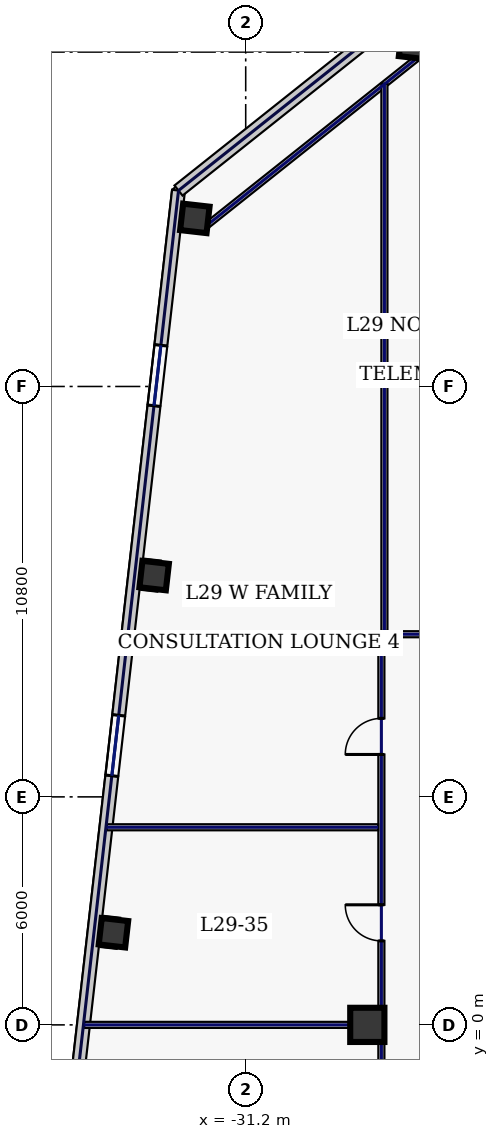
"""IFC4 building model, lengths in metres.
Left out: names, types, materials, properties, quantities, classifications, styles, units other than length and angle.
Written with IfcOpenShell. Run it as: python <this file> out.ifc"""

import sys

from ifc_helpers import new_model, si_unit, direction, frame, frame_2d, origin, origin_2d, place, context, subcontext, project, spatial, rectangle, hollow_rectangle, extrude, element, fill, save


model = new_model("IFC4")
c1 = context("Model", 3, precision=1e-05, world=origin(), true_north=direction((0.0, 1.0)))
c2 = subcontext(c1, "Body", "Model", "MODEL_VIEW")
j1 = project(units=[si_unit("LENGTHUNIT", "METRE"), si_unit("PLANEANGLEUNIT", "RADIAN")], contexts=[c1])
p1 = place(None, origin())
s1 = spatial("IfcSite", under=j1, at=p1, CompositionType="ELEMENT")
p2 = place(p1, origin())
s2 = spatial("IfcBuilding", under=s1, at=p2, CompositionType="ELEMENT")
p3 = place(p2, frame((0.0, 0.0, 129.4)))
s3 = spatial("IfcBuildingStorey", under=s2, at=p3, CompositionType="ELEMENT", Elevation=129.4)
p4 = place(p3, frame((-28.0, 0.0, 0.0), z_axis=(0.0, 0.0, 1.0), x_axis=(1.0, 0.0, 0.0)))
e1 = element("IfcColumn", 1, at=p4, inside=s3, PredefinedType="COLUMN", context=c2, shape_type="SweptSolid", body=[
    extrude(hollow_rectangle(XDim=0.9, YDim=0.9, WallThickness=0.04, at=origin_2d()), origin(), (0.0, 0.0, 1.0), 3.74),
])
for number, where, z_axis, x_axis in (
    (2, (-26.783, 25.801, 0.0), (0.0, 0.0, 1.0), (0.994, -0.113, 0.0)),
    (3, (-32.538, 21.223, 0.0), (0.0, 0.0, 1.0), (0.994, -0.113, 0.0)),
    (4, (-33.609, 11.824, 0.0), (0.0, 0.0, 1.0), (0.994, -0.113, 0.0)),
    (5, (-34.68, 2.425, 0.0), (0.0, 0.0, 1.0), (0.994, -0.113, 0.0)),
):
    element("IfcColumn", number, at=place(p3, frame(where, z_axis=z_axis, x_axis=x_axis)), inside=s3, PredefinedType="COLUMN", context=c2, shape_type="SweptSolid", body=[
        extrude(hollow_rectangle(XDim=0.7, YDim=0.7, WallThickness=0.032, at=origin_2d()), origin(), (0.0, 0.0, 1.0), 3.74),
    ])
p5 = place(p3, frame((-6.314, 23.982, 0.0), z_axis=(0.0, 0.0, 1.0), x_axis=(-0.993571362037, 0.113207546299, 0.0)))
e6 = element("IfcWall", 6, at=p5, inside=s3, PredefinedType="STANDARD", context=c2, shape_type="SweptSolid", body=[
    extrude(rectangle(XDim=21.223, YDim=0.34, at=frame_2d((10.611, 0.0))), origin(), (0.0, 0.0, 1.0), 3.74),
])
p6 = place(p5, frame((17.265, 0.0, 0.22)))
e7 = element("IfcOpeningElement", 7, at=p6, cuts=e6, PredefinedType="OPENING", context=c2, shape_type="SweptSolid", body=[
    extrude(rectangle(XDim=1.6, YDim=1.2, at=frame_2d((0.8, 0.6))), frame((0.0, 0.18, 0.0), z_axis=(0.0, -1.0, 0.0), x_axis=(1.0, 0.0, 0.0)), (0.0, 0.0, 1.0), 0.36),
])
p7 = place(p5, frame((12.794, 0.0, 0.67)))
e8 = element("IfcOpeningElement", 8, at=p7, cuts=e6, PredefinedType="OPENING", context=c2, shape_type="SweptSolid", body=[
    extrude(rectangle(XDim=2.1, YDim=2.2, at=frame_2d((1.05, 1.1))), frame((0.0, 0.18, 0.0), z_axis=(0.0, -1.0, 0.0), x_axis=(1.0, 0.0, 0.0)), (0.0, 0.0, 1.0), 0.36),
])
p8 = place(p5, frame((7.838, 0.0, 0.67)))
e9 = element("IfcOpeningElement", 9, at=p8, cuts=e6, PredefinedType="OPENING", context=c2, shape_type="SweptSolid", body=[
    extrude(rectangle(XDim=2.1, YDim=2.2, at=frame_2d((1.05, 1.1))), frame((0.0, 0.18, 0.0), z_axis=(0.0, -1.0, 0.0), x_axis=(1.0, 0.0, 0.0)), (0.0, 0.0, 1.0), 0.36),
])
p9 = place(p5, frame((3.616, 0.0, 0.67)))
e10 = element("IfcOpeningElement", 10, at=p9, cuts=e6, PredefinedType="OPENING", context=c2, shape_type="SweptSolid", body=[
    extrude(rectangle(XDim=0.85, YDim=1.85, at=frame_2d((0.425, 0.925))), frame((0.0, 0.18, 0.0), z_axis=(0.0, -1.0, 0.0), x_axis=(1.0, 0.0, 0.0)), (0.0, 0.0, 1.0), 0.36),
])
p10 = place(p3, frame((-32.968, 21.957, 0.0), z_axis=(0.0, 0.0, 1.0), x_axis=(-0.113201605824, -0.993572038877, 0.0)))
e11 = element("IfcWall", 11, at=p10, inside=s3, PredefinedType="STANDARD", context=c2, shape_type="SweptSolid", body=[
    extrude(rectangle(XDim=39.2, YDim=0.34, at=frame_2d((19.6, 0.0))), origin(), (0.0, 0.0, 1.0), 3.74),
])
p11 = place(p10, frame((4.1, 0.0, 0.58)))
e12 = element("IfcOpeningElement", 12, at=p11, cuts=e11, PredefinedType="OPENING", context=c2, shape_type="SweptSolid", body=[
    extrude(rectangle(XDim=1.6, YDim=2.3, at=frame_2d((0.8, 1.15))), frame((0.0, 0.18, 0.0), z_axis=(0.0, -1.0, 0.0), x_axis=(1.0, 0.0, 0.0)), (0.0, 0.0, 1.0), 0.36),
])
p12 = place(p10, frame((13.9, 0.0, 0.58)))
e13 = element("IfcOpeningElement", 13, at=p12, cuts=e11, PredefinedType="OPENING", context=c2, shape_type="SweptSolid", body=[
    extrude(rectangle(XDim=1.6, YDim=2.3, at=frame_2d((0.8, 1.15))), frame((0.0, 0.18, 0.0), z_axis=(0.0, -1.0, 0.0), x_axis=(1.0, 0.0, 0.0)), (0.0, 0.0, 1.0), 0.36),
])
p13 = place(p10, frame((23.7, 0.0, 0.58)))
e14 = element("IfcOpeningElement", 14, at=p13, cuts=e11, PredefinedType="OPENING", context=c2, shape_type="SweptSolid", body=[
    extrude(rectangle(XDim=1.6, YDim=2.3, at=frame_2d((0.8, 1.15))), frame((0.0, 0.18, 0.0), z_axis=(0.0, -1.0, 0.0), x_axis=(1.0, 0.0, 0.0)), (0.0, 0.0, 1.0), 0.36),
])
p14 = place(p10, frame((33.5, 0.0, 0.58)))
e15 = element("IfcOpeningElement", 15, at=p14, cuts=e11, PredefinedType="OPENING", context=c2, shape_type="SweptSolid", body=[
    extrude(rectangle(XDim=1.6, YDim=2.3, at=frame_2d((0.8, 1.15))), frame((0.0, 0.18, 0.0), z_axis=(0.0, -1.0, 0.0), x_axis=(1.0, 0.0, 0.0)), (0.0, 0.0, 1.0), 0.36),
])
p15 = place(p3, frame((-27.401, 26.385, 0.0), z_axis=(0.0, 0.0, 1.0), x_axis=(-0.78261359446, -0.622507800567, 0.0)))
e16 = element("IfcWall", 16, at=p15, inside=s3, PredefinedType="STANDARD", context=c2, shape_type="SweptSolid", body=[
    extrude(rectangle(XDim=7.114, YDim=0.34, at=frame_2d((3.557, 0.0))), origin(), (0.0, 0.0, 1.0), 3.74),
])
p16 = place(p3, frame((-26.571, 25.535, 0.0), z_axis=(0.0, 0.0, 1.0), x_axis=(-0.782617962887, -0.622502308564, 0.0)))
e17 = element("IfcWall", 17, at=p16, inside=s3, PredefinedType="PARTITIONING", context=c2, shape_type="SweptSolid", body=[
    extrude(rectangle(XDim=7.354, YDim=0.16, at=frame_2d((3.677, 0.0))), origin(), (0.0, 0.0, 1.0), 3.74),
])
p17 = place(p3, frame((-27.63, -10.015, 0.0), z_axis=(0.0, 0.0, 1.0), x_axis=(0.0, 1.0, 0.0)))
e18 = element("IfcWall", 18, at=p17, inside=s3, PredefinedType="PARTITIONING", context=c2, shape_type="SweptSolid", body=[
    extrude(rectangle(XDim=20.13, YDim=0.16, at=frame_2d((10.065, 0.0))), origin(), (0.0, 0.0, 1.0), 3.74),
])
p18 = place(p17, frame((2.169, 0.0, 0.0)))
e19 = element("IfcOpeningElement", 19, at=p18, cuts=e18, PredefinedType="OPENING", context=c2, shape_type="SweptSolid", body=[
    extrude(rectangle(XDim=0.95, YDim=2.2, at=frame_2d((0.475, 1.1))), frame((0.0, 0.09, 0.0), z_axis=(0.0, -1.0, 0.0), x_axis=(1.0, 0.0, 0.0)), (0.0, 0.0, 1.0), 0.18),
])
p19 = place(p17, frame((7.025, 0.0, 0.0)))
e20 = element("IfcOpeningElement", 20, at=p19, cuts=e18, PredefinedType="OPENING", context=c2, shape_type="SweptSolid", body=[
    extrude(rectangle(XDim=0.95, YDim=2.2, at=frame_2d((0.475, 1.1))), frame((0.0, 0.09, 0.0), z_axis=(0.0, -1.0, 0.0), x_axis=(1.0, 0.0, 0.0)), (0.0, 0.0, 1.0), 0.18),
])
p20 = place(p17, frame((12.225, 0.0, 0.0)))
e21 = element("IfcOpeningElement", 21, at=p20, cuts=e18, PredefinedType="OPENING", context=c2, shape_type="SweptSolid", body=[
    extrude(rectangle(XDim=0.95, YDim=2.2, at=frame_2d((0.475, 1.1))), frame((0.0, 0.09, 0.0), z_axis=(0.0, -1.0, 0.0), x_axis=(1.0, 0.0, 0.0)), (0.0, 0.0, 1.0), 0.18),
])
p21 = place(p17, frame((17.131, 0.0, 0.0)))
e22 = element("IfcOpeningElement", 22, at=p21, cuts=e18, PredefinedType="OPENING", context=c2, shape_type="SweptSolid", body=[
    extrude(rectangle(XDim=0.95, YDim=2.2, at=frame_2d((0.475, 1.1))), frame((0.0, 0.09, 0.0), z_axis=(0.0, -1.0, 0.0), x_axis=(1.0, 0.0, 0.0)), (0.0, 0.0, 1.0), 0.18),
])
p22 = place(p3, frame((-27.465, 10.28, 0.0), z_axis=(0.0, 0.0, 1.0), x_axis=(1.0, 0.0, 0.0)))
e23 = element("IfcWall", 23, at=p22, inside=s3, PredefinedType="PARTITIONING", context=c2, shape_type="SweptSolid", body=[
    extrude(rectangle(XDim=54.93, YDim=0.16, at=frame_2d((27.465, 0.0))), origin(), (0.0, 0.0, 1.0), 3.74),
])
p23 = place(p22, frame((1.869, 0.0, 0.0)))
e24 = element("IfcOpeningElement", 24, at=p23, cuts=e23, PredefinedType="OPENING", context=c2, shape_type="SweptSolid", body=[
    extrude(rectangle(XDim=1.3, YDim=2.2, at=frame_2d((0.65, 1.1))), frame((0.0, 0.09, 0.0), z_axis=(0.0, -1.0, 0.0), x_axis=(1.0, 0.0, 0.0)), (0.0, 0.0, 1.0), 0.18),
])
p24 = place(p22, frame((7.1, 0.0, 0.0)))
e25 = element("IfcOpeningElement", 25, at=p24, cuts=e23, PredefinedType="OPENING", context=c2, shape_type="SweptSolid", body=[
    extrude(rectangle(XDim=0.95, YDim=2.2, at=frame_2d((0.475, 1.1))), frame((0.0, 0.09, 0.0), z_axis=(0.0, -1.0, 0.0), x_axis=(1.0, 0.0, 0.0)), (0.0, 0.0, 1.0), 0.18),
])
p25 = place(p22, frame((12.5, 0.0, 0.0)))
e26 = element("IfcOpeningElement", 26, at=p25, cuts=e23, PredefinedType="OPENING", context=c2, shape_type="SweptSolid", body=[
    extrude(rectangle(XDim=0.95, YDim=2.2, at=frame_2d((0.475, 1.1))), frame((0.0, 0.09, 0.0), z_axis=(0.0, -1.0, 0.0), x_axis=(1.0, 0.0, 0.0)), (0.0, 0.0, 1.0), 0.18),
])
p26 = place(p22, frame((18.325, 0.0, 0.0)))
e27 = element("IfcOpeningElement", 27, at=p26, cuts=e23, PredefinedType="OPENING", context=c2, shape_type="SweptSolid", body=[
    extrude(rectangle(XDim=0.95, YDim=2.2, at=frame_2d((0.475, 1.1))), frame((0.0, 0.09, 0.0), z_axis=(0.0, -1.0, 0.0), x_axis=(1.0, 0.0, 0.0)), (0.0, 0.0, 1.0), 0.18),
])
p27 = place(p22, frame((24.575, 0.0, 0.0)))
e28 = element("IfcOpeningElement", 28, at=p27, cuts=e23, PredefinedType="OPENING", context=c2, shape_type="SweptSolid", body=[
    extrude(rectangle(XDim=0.95, YDim=2.2, at=frame_2d((0.475, 1.1))), frame((0.0, 0.09, 0.0), z_axis=(0.0, -1.0, 0.0), x_axis=(1.0, 0.0, 0.0)), (0.0, 0.0, 1.0), 0.18),
])
p28 = place(p22, frame((30.69, 0.0, 0.0)))
e29 = element("IfcOpeningElement", 29, at=p28, cuts=e23, PredefinedType="OPENING", context=c2, shape_type="SweptSolid", body=[
    extrude(rectangle(XDim=1.3, YDim=2.2, at=frame_2d((0.65, 1.1))), frame((0.0, 0.09, 0.0), z_axis=(0.0, -1.0, 0.0), x_axis=(1.0, 0.0, 0.0)), (0.0, 0.0, 1.0), 0.18),
])
p29 = place(p22, frame((37.02, 0.0, 0.0)))
e30 = element("IfcOpeningElement", 30, at=p29, cuts=e23, PredefinedType="OPENING", context=c2, shape_type="SweptSolid", body=[
    extrude(rectangle(XDim=1.3, YDim=2.2, at=frame_2d((0.65, 1.1))), frame((0.0, 0.09, 0.0), z_axis=(0.0, -1.0, 0.0), x_axis=(1.0, 0.0, 0.0)), (0.0, 0.0, 1.0), 0.18),
])
p30 = place(p22, frame((44.73, 0.0, 0.0)))
e31 = element("IfcOpeningElement", 31, at=p30, cuts=e23, PredefinedType="OPENING", context=c2, shape_type="SweptSolid", body=[
    extrude(rectangle(XDim=1.3, YDim=2.2, at=frame_2d((0.65, 1.1))), frame((0.0, 0.09, 0.0), z_axis=(0.0, -1.0, 0.0), x_axis=(1.0, 0.0, 0.0)), (0.0, 0.0, 1.0), 0.18),
])
p31 = place(p22, frame((51.956, 0.0, 0.0)))
e32 = element("IfcOpeningElement", 32, at=p31, cuts=e23, PredefinedType="OPENING", context=c2, shape_type="SweptSolid", body=[
    extrude(rectangle(XDim=0.95, YDim=2.2, at=frame_2d((0.475, 1.1))), frame((0.0, 0.09, 0.0), z_axis=(0.0, -1.0, 0.0), x_axis=(1.0, 0.0, 0.0)), (0.0, 0.0, 1.0), 0.18),
])
p32 = place(p3, frame((-27.55, 10.365, 0.0), z_axis=(0.0, 0.0, 1.0), x_axis=(0.0, 1.0, 0.0)))
e33 = element("IfcWall", 33, at=p32, inside=s3, PredefinedType="PARTITIONING", context=c2, shape_type="SweptSolid", body=[
    extrude(rectangle(XDim=14.409, YDim=0.16, at=frame_2d((7.204, 0.0))), origin(), (0.0, 0.0, 1.0), 3.74),
])
p33 = place(p3, frame((-35.449, 0.0, 0.0), z_axis=(0.0, 0.0, 1.0), x_axis=(1.0, 0.0, 0.0)))
e34 = element("IfcWall", 34, at=p33, inside=s3, PredefinedType="PARTITIONING", context=c2, shape_type="SweptSolid", body=[
    extrude(rectangle(XDim=7.734, YDim=0.16, at=frame_2d((3.867, 0.0))), origin(), (0.0, 0.0, 1.0), 3.74),
])
p34 = place(p3, frame((-34.857, 5.2, 0.0), z_axis=(0.0, 0.0, 1.0), x_axis=(1.0, 0.0, 0.0)))
e35 = element("IfcWall", 35, at=p34, inside=s3, PredefinedType="PARTITIONING", context=c2, shape_type="SweptSolid", body=[
    extrude(rectangle(XDim=7.142, YDim=0.16, at=frame_2d((3.571, 0.0))), origin(), (0.0, 0.0, 1.0), 3.74),
])
p35 = place(p11, origin())
e36 = element("IfcWindow", 36, at=p35, inside=s3, PartitioningType="SINGLE_PANEL", PredefinedType="WINDOW", context=c2, shape_type="SweptSolid", body=[
    extrude(rectangle(XDim=1.6, YDim=2.3, at=frame_2d((0.8, 1.15))), frame((0.0, 0.03, 0.0), z_axis=(0.0, -1.0, 0.0), x_axis=(1.0, 0.0, 0.0)), (0.0, 0.0, 1.0), 0.06),
])
fill(e12, e36)
p36 = place(p12, origin())
e37 = element("IfcWindow", 37, at=p36, inside=s3, PartitioningType="SINGLE_PANEL", PredefinedType="WINDOW", context=c2, shape_type="SweptSolid", body=[
    extrude(rectangle(XDim=1.6, YDim=2.3, at=frame_2d((0.8, 1.15))), frame((0.0, 0.03, 0.0), z_axis=(0.0, -1.0, 0.0), x_axis=(1.0, 0.0, 0.0)), (0.0, 0.0, 1.0), 0.06),
])
fill(e13, e37)
p37 = place(p20, origin())
e38 = element("IfcDoor", 38, at=p37, inside=s3, OperationType="SINGLE_SWING_RIGHT", PredefinedType="DOOR", context=c2, shape_type="SweptSolid", body=[
    extrude(rectangle(XDim=0.95, YDim=2.2, at=frame_2d((0.475, 1.1))), frame((0.0, 0.025, 0.0), z_axis=(0.0, -1.0, 0.0), x_axis=(1.0, 0.0, 0.0)), (0.0, 0.0, 1.0), 0.05),
])
fill(e21, e38)
p38 = place(p21, origin())
e39 = element("IfcDoor", 39, at=p38, inside=s3, OperationType="SINGLE_SWING_LEFT", PredefinedType="DOOR", context=c2, shape_type="SweptSolid", body=[
    extrude(rectangle(XDim=0.95, YDim=2.2, at=frame_2d((0.475, 1.1))), frame((0.0, 0.025, 0.0), z_axis=(0.0, -1.0, 0.0), x_axis=(1.0, 0.0, 0.0)), (0.0, 0.0, 1.0), 0.05),
])
fill(e22, e39)
save(model, sys.argv[1])
